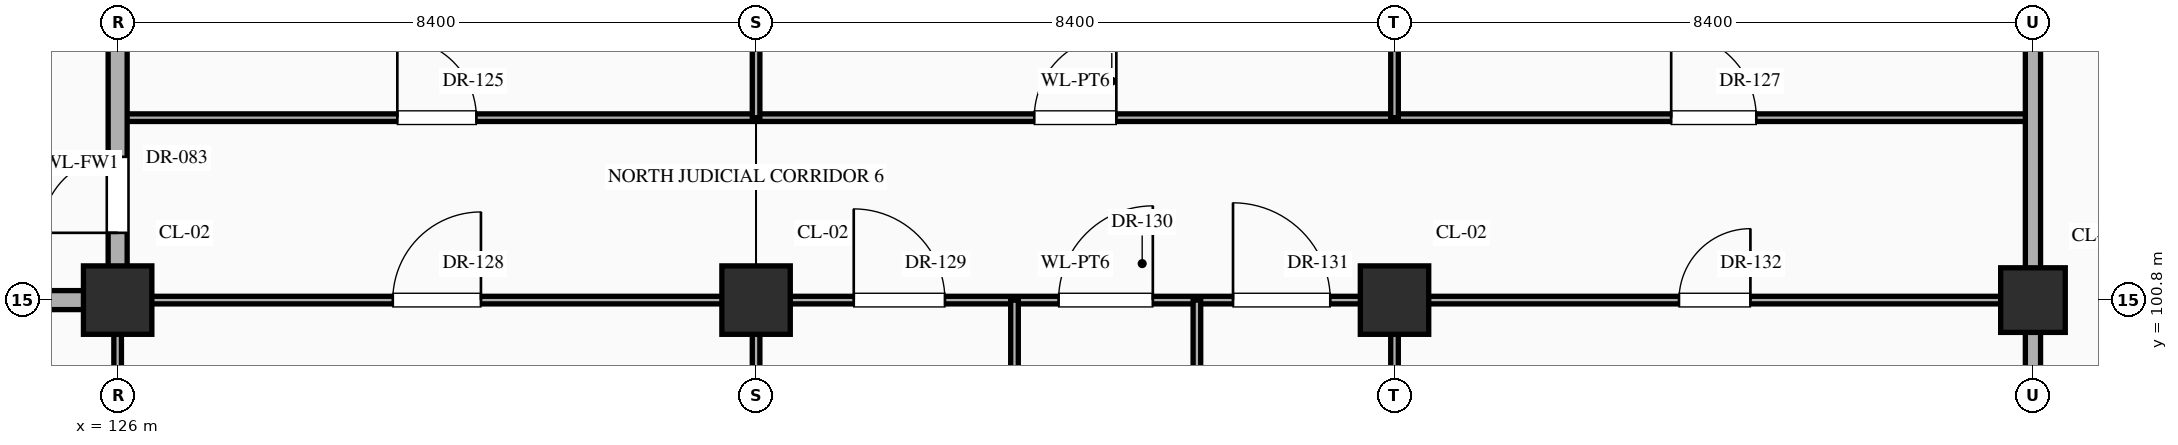
"""IFC4 building model, lengths in metres.
Left out: names, types, materials, properties, quantities, classifications, styles, units other than length and angle.
Written with IfcOpenShell. Run it as: python <this file> out.ifc"""

import sys

from ifc_helpers import new_model, si_unit, direction, frame, frame_2d, origin, origin_2d, place, context, subcontext, project, spatial, rectangle, extrude, element, fill, save


model = new_model("IFC4")
c1 = context("Model", 3, precision=1e-05, world=origin(), true_north=direction((0.0, 1.0)))
c2 = subcontext(c1, "Body", "Model", "MODEL_VIEW")
j1 = project(units=[si_unit("LENGTHUNIT", "METRE"), si_unit("PLANEANGLEUNIT", "RADIAN")], contexts=[c1])
p1 = place(None, origin())
s1 = spatial("IfcSite", under=j1, at=p1, CompositionType="ELEMENT")
p2 = place(p1, origin())
s2 = spatial("IfcBuilding", under=s1, at=p2, CompositionType="ELEMENT")
p3 = place(p2, frame((0.0, 0.0, -10.2)))
s3 = spatial("IfcBuildingStorey", under=s2, at=p3, CompositionType="ELEMENT", Elevation=-10.2)
for number, where, z_axis, x_axis in (
    (1, (126.0, 100.8, 0.0), (0.0, 0.0, 1.0), (1.0, 0.0, 0.0)),
    (2, (134.4, 100.8, 0.0), (0.0, 0.0, 1.0), (1.0, 0.0, 0.0)),
    (3, (142.8, 100.8, 0.0), (0.0, 0.0, 1.0), (1.0, 0.0, 0.0)),
):
    element("IfcColumn", number, at=place(p3, frame(where, z_axis=z_axis, x_axis=x_axis)), inside=s3, PredefinedType="COLUMN", context=c2, shape_type="SweptSolid", body=[
        extrude(rectangle(XDim=0.9, YDim=0.9, at=origin_2d()), origin(), (0.0, 0.0, 1.0), 4.8),
    ])
p4 = place(p3, frame((151.2, 100.8, 0.0), z_axis=(0.0, 0.0, 1.0), x_axis=(1.0, 0.0, 0.0)))
e4 = element("IfcColumn", 4, at=p4, inside=s3, PredefinedType="COLUMN", context=c2, shape_type="SweptSolid", body=[
    extrude(rectangle(XDim=0.85, YDim=0.85, at=origin_2d()), origin(), (0.0, 0.0, 1.0), 4.8),
])
p5 = place(p3, frame((121.8, 100.8, 0.0), z_axis=(0.0, 0.0, 1.0), x_axis=(1.0, 0.0, 0.0)))
e5 = element("IfcWall", 5, at=p5, inside=s3, PredefinedType="STANDARD", context=c2, shape_type="SweptSolid", body=[
    extrude(rectangle(XDim=4.2, YDim=0.25, at=frame_2d((2.1, 0.0))), origin(), (0.0, 0.0, 1.0), 3.63),
])
p6 = place(p3, frame((126.0, 100.8, 0.0), z_axis=(0.0, 0.0, 1.0), x_axis=(1.0, 0.0, 0.0)))
e6 = element("IfcWall", 6, at=p6, inside=s3, PredefinedType="STANDARD", context=c2, shape_type="SweptSolid", body=[
    extrude(rectangle(XDim=25.2, YDim=0.1, at=frame_2d((12.6, 0.0))), origin(), (0.0, 0.0, 1.0), 3.63),
])
p7 = place(p6, frame((3.62, 0.0, 0.0)))
e7 = element("IfcOpeningElement", 7, at=p7, cuts=e6, PredefinedType="OPENING", context=c2, shape_type="SweptSolid", body=[
    extrude(rectangle(XDim=1.16, YDim=2.3, at=frame_2d((0.58, 1.15))), frame((0.0, 0.062, 0.0), z_axis=(0.0, -1.0, 0.0), x_axis=(1.0, 0.0, 0.0)), (0.0, 0.0, 1.0), 0.124),
])
p8 = place(p6, frame((9.685, 0.0, 0.0)))
e8 = element("IfcOpeningElement", 8, at=p8, cuts=e6, PredefinedType="OPENING", context=c2, shape_type="SweptSolid", body=[
    extrude(rectangle(XDim=1.2, YDim=2.35, at=frame_2d((0.6, 1.175))), frame((0.0, 0.062, 0.0), z_axis=(0.0, -1.0, 0.0), x_axis=(1.0, 0.0, 0.0)), (0.0, 0.0, 1.0), 0.124),
])
p9 = place(p6, frame((12.38, 0.0, 0.0)))
e9 = element("IfcOpeningElement", 9, at=p9, cuts=e6, PredefinedType="OPENING", context=c2, shape_type="SweptSolid", body=[
    extrude(rectangle(XDim=1.24, YDim=2.3, at=frame_2d((0.62, 1.15))), frame((0.0, 0.062, 0.0), z_axis=(0.0, -1.0, 0.0), x_axis=(1.0, 0.0, 0.0)), (0.0, 0.0, 1.0), 0.124),
])
p10 = place(p6, frame((14.675, 0.0, 0.0)))
e10 = element("IfcOpeningElement", 10, at=p10, cuts=e6, PredefinedType="OPENING", context=c2, shape_type="SweptSolid", body=[
    extrude(rectangle(XDim=1.28, YDim=2.35, at=frame_2d((0.64, 1.175))), frame((0.0, 0.062, 0.0), z_axis=(0.0, -1.0, 0.0), x_axis=(1.0, 0.0, 0.0)), (0.0, 0.0, 1.0), 0.124),
])
p11 = place(p6, frame((20.542, 0.0, 0.0)))
e11 = element("IfcOpeningElement", 11, at=p11, cuts=e6, PredefinedType="OPENING", context=c2, shape_type="SweptSolid", body=[
    extrude(rectangle(XDim=0.94, YDim=2.3, at=frame_2d((0.47, 1.15))), frame((0.0, 0.062, 0.0), z_axis=(0.0, -1.0, 0.0), x_axis=(1.0, 0.0, 0.0)), (0.0, 0.0, 1.0), 0.124),
])
p12 = place(p3, frame((126.0, 103.2, 0.0), z_axis=(0.0, 0.0, 1.0), x_axis=(1.0, 0.0, 0.0)))
e12 = element("IfcWall", 12, at=p12, inside=s3, PredefinedType="STANDARD", context=c2, shape_type="SweptSolid", body=[
    extrude(rectangle(XDim=25.2, YDim=0.1, at=frame_2d((12.6, 0.0))), origin(), (0.0, 0.0, 1.0), 4.48),
])
p13 = place(p12, frame((3.68, 0.0, 0.0)))
e13 = element("IfcOpeningElement", 13, at=p13, cuts=e12, PredefinedType="OPENING", context=c2, shape_type="SweptSolid", body=[
    extrude(rectangle(XDim=1.04, YDim=2.2, at=frame_2d((0.52, 1.1))), frame((0.0, 0.062, 0.0), z_axis=(0.0, -1.0, 0.0), x_axis=(1.0, 0.0, 0.0)), (0.0, 0.0, 1.0), 0.124),
])
p14 = place(p12, frame((12.06, 0.0, 0.0)))
e14 = element("IfcOpeningElement", 14, at=p14, cuts=e12, PredefinedType="OPENING", context=c2, shape_type="SweptSolid", body=[
    extrude(rectangle(XDim=1.08, YDim=2.25, at=frame_2d((0.54, 1.125))), frame((0.0, 0.062, 0.0), z_axis=(0.0, -1.0, 0.0), x_axis=(1.0, 0.0, 0.0)), (0.0, 0.0, 1.0), 0.124),
])
p15 = place(p12, frame((20.44, 0.0, 0.0)))
e15 = element("IfcOpeningElement", 15, at=p15, cuts=e12, PredefinedType="OPENING", context=c2, shape_type="SweptSolid", body=[
    extrude(rectangle(XDim=1.12, YDim=2.25, at=frame_2d((0.56, 1.125))), frame((0.0, 0.062, 0.0), z_axis=(0.0, -1.0, 0.0), x_axis=(1.0, 0.0, 0.0)), (0.0, 0.0, 1.0), 0.124),
])
p16 = place(p3, frame((126.0, 96.0, 0.0), z_axis=(0.0, 0.0, 1.0), x_axis=(0.0, 1.0, 0.0)))
e16 = element("IfcWall", 16, at=p16, inside=s3, PredefinedType="STANDARD", context=c2, shape_type="SweptSolid", body=[
    extrude(rectangle(XDim=4.8, YDim=0.1, at=frame_2d((2.4, 0.0))), origin(), (0.0, 0.0, 1.0), 3.73),
])
p17 = place(p3, frame((126.0, 100.8, 0.0), z_axis=(0.0, 0.0, 1.0), x_axis=(0.0, 1.0, 0.0)))
e17 = element("IfcWall", 17, at=p17, inside=s3, PredefinedType="STANDARD", context=c2, shape_type="SweptSolid", body=[
    extrude(rectangle(XDim=3.6, YDim=0.25, at=frame_2d((1.8, 0.0))), origin(), (0.0, 0.0, 1.0), 3.73),
])
p18 = place(p17, frame((0.885, 0.0, 0.0)))
e18 = element("IfcOpeningElement", 18, at=p18, cuts=e17, PredefinedType="OPENING", context=c2, shape_type="SweptSolid", body=[
    extrude(rectangle(XDim=1.0, YDim=2.2, at=frame_2d((0.5, 1.1))), frame((0.0, 0.137, 0.0), z_axis=(0.0, -1.0, 0.0), x_axis=(1.0, 0.0, 0.0)), (0.0, 0.0, 1.0), 0.274),
])
for number, where, z_axis, x_axis in (
    (19, (134.4, 96.0, 0.0), (0.0, 0.0, 1.0), (0.0, 1.0, 0.0)),
    (20, (134.4, 103.2, 0.0), (0.0, 0.0, 1.0), (0.0, 1.0, 0.0)),
):
    element("IfcWall", number, at=place(p3, frame(where, z_axis=z_axis, x_axis=x_axis)), inside=s3, PredefinedType="STANDARD", context=c2, shape_type="SweptSolid", body=[
        extrude(rectangle(XDim=4.8, YDim=0.1, at=frame_2d((2.4, 0.0))), origin(), (0.0, 0.0, 1.0), 3.73),
    ])
p19 = place(p3, frame((137.8, 96.0, 0.0), z_axis=(0.0, 0.0, 1.0), x_axis=(0.0, 1.0, 0.0)))
e21 = element("IfcWall", 21, at=p19, inside=s3, PredefinedType="STANDARD", context=c2, shape_type="SweptSolid", body=[
    extrude(rectangle(XDim=4.8, YDim=0.1, at=frame_2d((2.4, 0.0))), origin(), (0.0, 0.0, 1.0), 4.48),
])
p20 = place(p19, frame((1.89, 0.0, 0.0)))
e22 = element("IfcOpeningElement", 22, at=p20, cuts=e21, PredefinedType="OPENING", context=c2, shape_type="SweptSolid", body=[
    extrude(rectangle(XDim=1.02, YDim=2.4, at=frame_2d((0.51, 1.2))), frame((0.0, 0.062, 0.0), z_axis=(0.0, -1.0, 0.0), x_axis=(1.0, 0.0, 0.0)), (0.0, 0.0, 1.0), 0.124),
])
p21 = place(p3, frame((140.2, 96.0, 0.0), z_axis=(0.0, 0.0, 1.0), x_axis=(0.0, 1.0, 0.0)))
e23 = element("IfcWall", 23, at=p21, inside=s3, PredefinedType="STANDARD", context=c2, shape_type="SweptSolid", body=[
    extrude(rectangle(XDim=4.8, YDim=0.1, at=frame_2d((2.4, 0.0))), origin(), (0.0, 0.0, 1.0), 4.48),
])
p22 = place(p21, frame((1.87, 0.0, 0.0)))
e24 = element("IfcOpeningElement", 24, at=p22, cuts=e23, PredefinedType="OPENING", context=c2, shape_type="SweptSolid", body=[
    extrude(rectangle(XDim=1.06, YDim=2.4, at=frame_2d((0.53, 1.2))), frame((0.0, 0.062, 0.0), z_axis=(0.0, -1.0, 0.0), x_axis=(1.0, 0.0, 0.0)), (0.0, 0.0, 1.0), 0.124),
])
for number, where, z_axis, x_axis in (
    (25, (142.8, 96.0, 0.0), (0.0, 0.0, 1.0), (0.0, 1.0, 0.0)),
    (26, (142.8, 103.2, 0.0), (0.0, 0.0, 1.0), (0.0, 1.0, 0.0)),
):
    element("IfcWall", number, at=place(p3, frame(where, z_axis=z_axis, x_axis=x_axis)), inside=s3, PredefinedType="STANDARD", context=c2, shape_type="SweptSolid", body=[
        extrude(rectangle(XDim=4.8, YDim=0.1, at=frame_2d((2.4, 0.0))), origin(), (0.0, 0.0, 1.0), 3.73),
    ])
p23 = place(p3, frame((151.2, 91.2, 0.0), z_axis=(0.0, 0.0, 1.0), x_axis=(0.0, 1.0, 0.0)))
e27 = element("IfcWall", 27, at=p23, inside=s3, PredefinedType="STANDARD", context=c2, shape_type="SweptSolid", body=[
    extrude(rectangle(XDim=16.8, YDim=0.2, at=frame_2d((8.4, 0.0))), origin(), (0.0, 0.0, 1.0), 3.73),
])
p24 = place(p18, origin())
e28 = element("IfcDoor", 28, at=p24, inside=s3, OperationType="SINGLE_SWING_LEFT", PredefinedType="DOOR", context=c2, shape_type="SweptSolid", body=[
    extrude(rectangle(XDim=1.0, YDim=2.2, at=frame_2d((0.5, 1.1))), frame((0.0, 0.025, 0.0), z_axis=(0.0, -1.0, 0.0), x_axis=(1.0, 0.0, 0.0)), (0.0, 0.0, 1.0), 0.05),
])
fill(e18, e28)
p25 = place(p13, origin())
e29 = element("IfcDoor", 29, at=p25, inside=s3, OperationType="SINGLE_SWING_LEFT", PredefinedType="DOOR", context=c2, shape_type="SweptSolid", body=[
    extrude(rectangle(XDim=1.04, YDim=2.2, at=frame_2d((0.52, 1.1))), frame((0.0, 0.025, 0.0), z_axis=(0.0, -1.0, 0.0), x_axis=(1.0, 0.0, 0.0)), (0.0, 0.0, 1.0), 0.05),
])
fill(e13, e29)
p26 = place(p14, origin())
e30 = element("IfcDoor", 30, at=p26, inside=s3, OperationType="SINGLE_SWING_RIGHT", PredefinedType="DOOR", context=c2, shape_type="SweptSolid", body=[
    extrude(rectangle(XDim=1.08, YDim=2.25, at=frame_2d((0.54, 1.125))), frame((0.0, 0.025, 0.0), z_axis=(0.0, -1.0, 0.0), x_axis=(1.0, 0.0, 0.0)), (0.0, 0.0, 1.0), 0.05),
])
fill(e14, e30)
p27 = place(p15, origin())
e31 = element("IfcDoor", 31, at=p27, inside=s3, OperationType="SINGLE_SWING_LEFT", PredefinedType="DOOR", context=c2, shape_type="SweptSolid", body=[
    extrude(rectangle(XDim=1.12, YDim=2.25, at=frame_2d((0.56, 1.125))), frame((0.0, 0.025, 0.0), z_axis=(0.0, -1.0, 0.0), x_axis=(1.0, 0.0, 0.0)), (0.0, 0.0, 1.0), 0.05),
])
fill(e15, e31)
p28 = place(p7, origin())
e32 = element("IfcDoor", 32, at=p28, inside=s3, OperationType="SINGLE_SWING_RIGHT", PredefinedType="DOOR", context=c2, shape_type="SweptSolid", body=[
    extrude(rectangle(XDim=1.16, YDim=2.3, at=frame_2d((0.58, 1.15))), frame((0.0, 0.025, 0.0), z_axis=(0.0, -1.0, 0.0), x_axis=(1.0, 0.0, 0.0)), (0.0, 0.0, 1.0), 0.05),
])
fill(e7, e32)
p29 = place(p8, origin())
e33 = element("IfcDoor", 33, at=p29, inside=s3, OperationType="SINGLE_SWING_LEFT", PredefinedType="DOOR", context=c2, shape_type="SweptSolid", body=[
    extrude(rectangle(XDim=1.2, YDim=2.35, at=frame_2d((0.6, 1.175))), frame((0.0, 0.025, 0.0), z_axis=(0.0, -1.0, 0.0), x_axis=(1.0, 0.0, 0.0)), (0.0, 0.0, 1.0), 0.05),
])
fill(e8, e33)
p30 = place(p9, origin())
e34 = element("IfcDoor", 34, at=p30, inside=s3, OperationType="SINGLE_SWING_RIGHT", PredefinedType="DOOR", context=c2, shape_type="SweptSolid", body=[
    extrude(rectangle(XDim=1.24, YDim=2.3, at=frame_2d((0.62, 1.15))), frame((0.0, 0.025, 0.0), z_axis=(0.0, -1.0, 0.0), x_axis=(1.0, 0.0, 0.0)), (0.0, 0.0, 1.0), 0.05),
])
fill(e9, e34)
p31 = place(p10, origin())
e35 = element("IfcDoor", 35, at=p31, inside=s3, OperationType="SINGLE_SWING_LEFT", PredefinedType="DOOR", context=c2, shape_type="SweptSolid", body=[
    extrude(rectangle(XDim=1.28, YDim=2.35, at=frame_2d((0.64, 1.175))), frame((0.0, 0.025, 0.0), z_axis=(0.0, -1.0, 0.0), x_axis=(1.0, 0.0, 0.0)), (0.0, 0.0, 1.0), 0.05),
])
fill(e10, e35)
p32 = place(p11, origin())
e36 = element("IfcDoor", 36, at=p32, inside=s3, OperationType="SINGLE_SWING_RIGHT", PredefinedType="DOOR", context=c2, shape_type="SweptSolid", body=[
    extrude(rectangle(XDim=0.94, YDim=2.3, at=frame_2d((0.47, 1.15))), frame((0.0, 0.025, 0.0), z_axis=(0.0, -1.0, 0.0), x_axis=(1.0, 0.0, 0.0)), (0.0, 0.0, 1.0), 0.05),
])
fill(e11, e36)
save(model, sys.argv[1])
